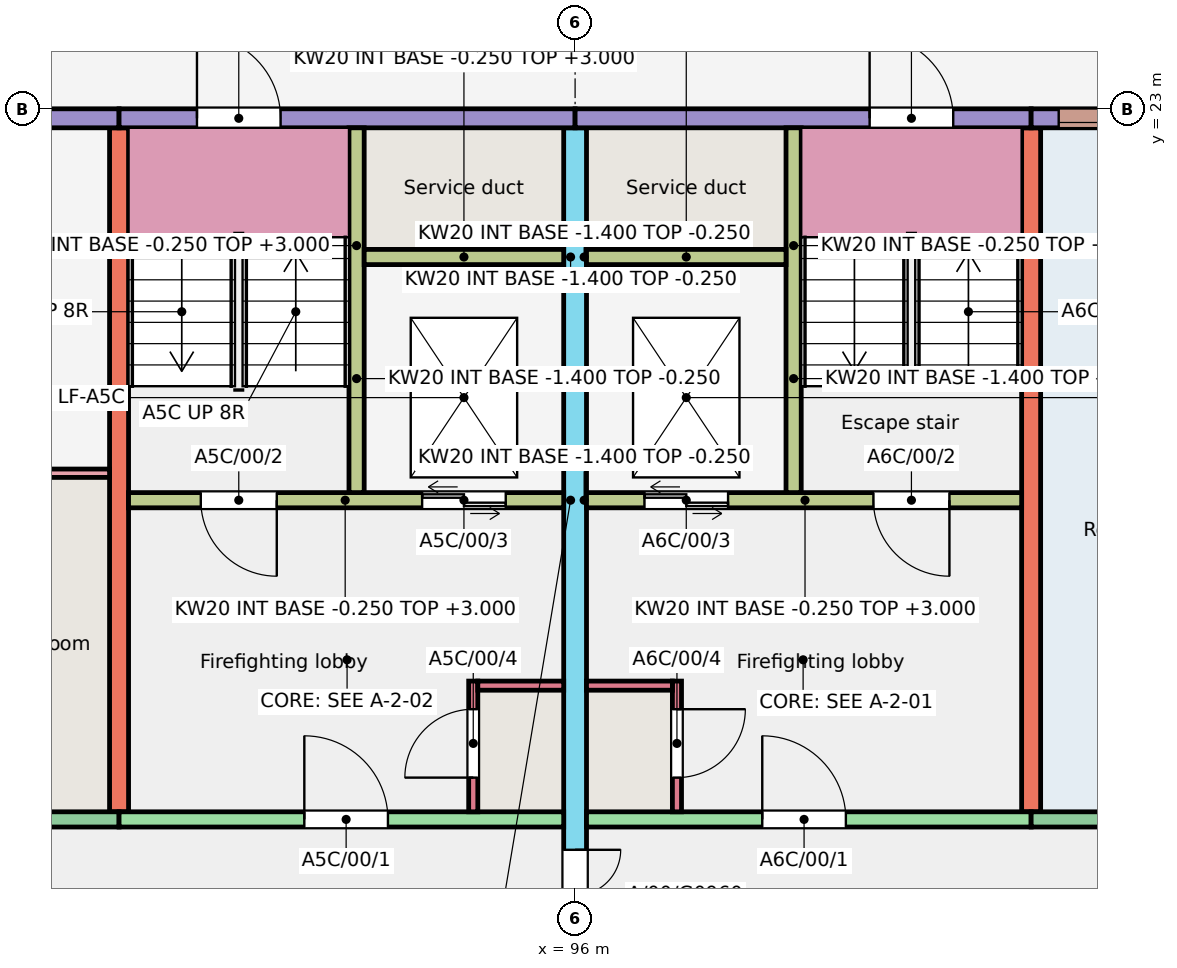
"""IFC4 building model, lengths in metres.
Left out: names, types, materials, properties, quantities, classifications, styles, units other than length and angle.
Written with IfcOpenShell. Run it as: python <this file> out.ifc"""

import sys

from ifc_helpers import new_model, si_unit, direction, frame, frame_2d, origin, place, context, subcontext, project, spatial, rectangle, extrude, element, fill, save


model = new_model("IFC4")
c1 = context("Model", 3, precision=1e-05, world=origin(), true_north=direction((0.0, 1.0)))
c2 = subcontext(c1, "Body", "Model", "MODEL_VIEW")
j1 = project(units=[si_unit("LENGTHUNIT", "METRE"), si_unit("PLANEANGLEUNIT", "RADIAN")], contexts=[c1])
p1 = place(None, origin())
s1 = spatial("IfcSite", under=j1, at=p1, CompositionType="ELEMENT")
p2 = place(p1, origin())
s2 = spatial("IfcBuilding", under=s1, at=p2, CompositionType="ELEMENT")
p3 = place(p2, origin())
s3 = spatial("IfcBuildingStorey", under=s2, at=p3, CompositionType="ELEMENT", Elevation=0.0)
p4 = place(p3, frame((90.0, 13.75, -0.25), z_axis=(0.0, 0.0, 1.0), x_axis=(0.0, 1.0, 0.0)))
e1 = element("IfcWall", 1, at=p4, inside=s3, PredefinedType="SHEAR", context=c2, shape_type="SweptSolid", body=[
    extrude(rectangle(XDim=9.0, YDim=0.25, at=frame_2d((4.5, 0.0))), origin(), (0.0, 0.0, 1.0), 3.25),
])
p5 = place(p3, frame((96.0, 11.75, -0.25), z_axis=(0.0, 0.0, 1.0), x_axis=(0.0, 1.0, 0.0)))
e2 = element("IfcWall", 2, at=p5, inside=s3, PredefinedType="SHEAR", context=c2, shape_type="SweptSolid", body=[
    extrude(rectangle(XDim=11.0, YDim=0.3, at=frame_2d((5.5, 0.0))), origin(), (0.0, 0.0, 1.0), 3.25),
])
p6 = place(p5, frame((0.3, 0.0, 0.25)))
e3 = element("IfcOpeningElement", 3, at=p6, cuts=e2, PredefinedType="OPENING", context=c2, shape_type="SweptSolid", body=[
    extrude(rectangle(XDim=1.2, YDim=2.1, at=frame_2d((0.6, 1.05))), frame((0.0, 0.16, 0.0), z_axis=(0.0, -1.0, 0.0), x_axis=(1.0, 0.0, 0.0)), (0.0, 0.0, 1.0), 0.32),
])
p7 = place(p3, frame((102.0, 13.75, -0.25), z_axis=(0.0, 0.0, 1.0), x_axis=(0.0, 1.0, 0.0)))
e4 = element("IfcWall", 4, at=p7, inside=s3, PredefinedType="SHEAR", context=c2, shape_type="SweptSolid", body=[
    extrude(rectangle(XDim=9.0, YDim=0.25, at=frame_2d((4.5, 0.0))), origin(), (0.0, 0.0, 1.0), 3.25),
])
p8 = place(p3, frame((86.4, 22.875, -0.25), z_axis=(0.0, 0.0, 1.0), x_axis=(1.0, 0.0, 0.0)))
e5 = element("IfcWall", 5, at=p8, inside=s3, PredefinedType="SOLIDWALL", context=c2, shape_type="SweptSolid", body=[
    extrude(rectangle(XDim=3.6, YDim=0.25, at=frame_2d((1.8, 0.0))), origin(), (0.0, 0.0, 1.0), 3.25),
])
p9 = place(p8, frame((1.3, 0.0, 0.25)))
e6 = element("IfcOpeningElement", 6, at=p9, cuts=e5, PredefinedType="OPENING", context=c2, shape_type="SweptSolid", body=[
    extrude(rectangle(XDim=1.0, YDim=2.1, at=frame_2d((0.5, 1.05))), frame((0.0, 0.135, 0.0), z_axis=(0.0, -1.0, 0.0), x_axis=(1.0, 0.0, 0.0)), (0.0, 0.0, 1.0), 0.27),
])
p10 = place(p3, frame((86.4, 13.65, -0.25), z_axis=(0.0, 0.0, 1.0), x_axis=(1.0, 0.0, 0.0)))
e7 = element("IfcWall", 7, at=p10, inside=s3, PredefinedType="SOLIDWALL", context=c2, shape_type="SweptSolid", body=[
    extrude(rectangle(XDim=3.6, YDim=0.2, at=frame_2d((1.8, 0.0))), origin(), (0.0, 0.0, 1.0), 3.25),
])
p11 = place(p10, frame((1.3, 0.0, 0.25)))
e8 = element("IfcOpeningElement", 8, at=p11, cuts=e7, PredefinedType="OPENING", context=c2, shape_type="SweptSolid", body=[
    extrude(rectangle(XDim=1.0, YDim=2.1, at=frame_2d((0.5, 1.05))), frame((0.0, 0.11, 0.0), z_axis=(0.0, -1.0, 0.0), x_axis=(1.0, 0.0, 0.0)), (0.0, 0.0, 1.0), 0.22),
])
p12 = place(p3, frame((90.0, 22.875, -0.25), z_axis=(0.0, 0.0, 1.0), x_axis=(1.0, 0.0, 0.0)))
e9 = element("IfcWall", 9, at=p12, inside=s3, PredefinedType="SOLIDWALL", context=c2, shape_type="SweptSolid", body=[
    extrude(rectangle(XDim=6.0, YDim=0.25, at=frame_2d((3.0, 0.0))), origin(), (0.0, 0.0, 1.0), 3.25),
])
p13 = place(p12, frame((1.025, 0.0, 0.25)))
e10 = element("IfcOpeningElement", 10, at=p13, cuts=e9, PredefinedType="OPENING", context=c2, shape_type="SweptSolid", body=[
    extrude(rectangle(XDim=1.1, YDim=2.1, at=frame_2d((0.55, 1.05))), frame((0.0, 0.135, 0.0), z_axis=(0.0, -1.0, 0.0), x_axis=(1.0, 0.0, 0.0)), (0.0, 0.0, 1.0), 0.27),
])
p14 = place(p3, frame((90.0, 13.65, -0.25), z_axis=(0.0, 0.0, 1.0), x_axis=(1.0, 0.0, 0.0)))
e11 = element("IfcWall", 11, at=p14, inside=s3, PredefinedType="SHEAR", context=c2, shape_type="SweptSolid", body=[
    extrude(rectangle(XDim=5.85, YDim=0.2, at=frame_2d((2.925, 0.0))), origin(), (0.0, 0.0, 1.0), 3.25),
])
p15 = place(p14, frame((2.438, 0.0, 0.25)))
e12 = element("IfcOpeningElement", 12, at=p15, cuts=e11, PredefinedType="OPENING", context=c2, shape_type="SweptSolid", body=[
    extrude(rectangle(XDim=1.1, YDim=2.1, at=frame_2d((0.55, 1.05))), frame((0.0, 0.11, 0.0), z_axis=(0.0, -1.0, 0.0), x_axis=(1.0, 0.0, 0.0)), (0.0, 0.0, 1.0), 0.22),
])
p16 = place(p3, frame((90.125, 17.85, -0.25), z_axis=(0.0, 0.0, 1.0), x_axis=(1.0, 0.0, 0.0)))
e13 = element("IfcWall", 13, at=p16, inside=s3, PredefinedType="SHEAR", context=c2, shape_type="SweptSolid", body=[
    extrude(rectangle(XDim=5.725, YDim=0.2, at=frame_2d((2.863, 0.0))), origin(), (0.0, 0.0, 1.0), 3.25),
])
p17 = place(p16, frame((0.95, 0.0, 0.25)))
e14 = element("IfcOpeningElement", 14, at=p17, cuts=e13, PredefinedType="OPENING", context=c2, shape_type="SweptSolid", body=[
    extrude(rectangle(XDim=1.0, YDim=2.1, at=frame_2d((0.5, 1.05))), frame((0.0, 0.11, 0.0), z_axis=(0.0, -1.0, 0.0), x_axis=(1.0, 0.0, 0.0)), (0.0, 0.0, 1.0), 0.22),
])
p18 = place(p16, frame((3.863, 0.0, 0.25)))
e15 = element("IfcOpeningElement", 15, at=p18, cuts=e13, PredefinedType="OPENING", context=c2, shape_type="SweptSolid", body=[
    extrude(rectangle(XDim=1.1, YDim=2.1, at=frame_2d((0.55, 1.05))), frame((0.0, 0.11, 0.0), z_axis=(0.0, -1.0, 0.0), x_axis=(1.0, 0.0, 0.0)), (0.0, 0.0, 1.0), 0.22),
])
p19 = place(p3, frame((93.125, 17.95, -0.25), z_axis=(0.0, 0.0, 1.0), x_axis=(0.0, 1.0, 0.0)))
e16 = element("IfcWall", 16, at=p19, inside=s3, PredefinedType="SHEAR", context=c2, shape_type="SweptSolid", body=[
    extrude(rectangle(XDim=4.8, YDim=0.2, at=frame_2d((2.4, 0.0))), origin(), (0.0, 0.0, 1.0), 3.25),
])
p20 = place(p3, frame((93.225, 21.05, -0.25), z_axis=(0.0, 0.0, 1.0), x_axis=(1.0, 0.0, 0.0)))
e17 = element("IfcWall", 17, at=p20, inside=s3, PredefinedType="SHEAR", context=c2, shape_type="SweptSolid", body=[
    extrude(rectangle(XDim=2.625, YDim=0.2, at=frame_2d((1.312, 0.0))), origin(), (0.0, 0.0, 1.0), 3.25),
])
p21 = place(p3, frame((94.66, 13.75, -0.25), z_axis=(0.0, 0.0, 1.0), x_axis=(0.0, 1.0, 0.0)))
e18 = element("IfcWall", 18, at=p21, inside=s3, PredefinedType="SHEAR", context=c2, shape_type="SweptSolid", body=[
    extrude(rectangle(XDim=1.72, YDim=0.12, at=frame_2d((0.86, 0.0))), origin(), (0.0, 0.0, 1.0), 3.25),
])
p22 = place(p21, frame((0.45, 0.0, 0.25)))
e19 = element("IfcOpeningElement", 19, at=p22, cuts=e18, PredefinedType="OPENING", context=c2, shape_type="SweptSolid", body=[
    extrude(rectangle(XDim=0.9, YDim=2.1, at=frame_2d((0.45, 1.05))), frame((0.0, 0.07, 0.0), z_axis=(0.0, -1.0, 0.0), x_axis=(1.0, 0.0, 0.0)), (0.0, 0.0, 1.0), 0.14),
])
p23 = place(p3, frame((94.72, 15.41, -0.25), z_axis=(0.0, 0.0, 1.0), x_axis=(1.0, 0.0, 0.0)))
e20 = element("IfcWall", 20, at=p23, inside=s3, PredefinedType="SHEAR", context=c2, shape_type="SweptSolid", body=[
    extrude(rectangle(XDim=1.13, YDim=0.12, at=frame_2d((0.565, 0.0))), origin(), (0.0, 0.0, 1.0), 3.25),
])
p24 = place(p3, frame((96.0, 22.875, -0.25), z_axis=(0.0, 0.0, 1.0), x_axis=(1.0, 0.0, 0.0)))
e21 = element("IfcWall", 21, at=p24, inside=s3, PredefinedType="SOLIDWALL", context=c2, shape_type="SweptSolid", body=[
    extrude(rectangle(XDim=6.0, YDim=0.25, at=frame_2d((3.0, 0.0))), origin(), (0.0, 0.0, 1.0), 3.25),
])
p25 = place(p24, frame((3.875, 0.0, 0.25)))
e22 = element("IfcOpeningElement", 22, at=p25, cuts=e21, PredefinedType="OPENING", context=c2, shape_type="SweptSolid", body=[
    extrude(rectangle(XDim=1.1, YDim=2.1, at=frame_2d((0.55, 1.05))), frame((0.0, 0.135, 0.0), z_axis=(0.0, -1.0, 0.0), x_axis=(1.0, 0.0, 0.0)), (0.0, 0.0, 1.0), 0.27),
])
p26 = place(p3, frame((96.15, 13.65, -0.25), z_axis=(0.0, 0.0, 1.0), x_axis=(1.0, 0.0, 0.0)))
e23 = element("IfcWall", 23, at=p26, inside=s3, PredefinedType="SHEAR", context=c2, shape_type="SweptSolid", body=[
    extrude(rectangle(XDim=5.85, YDim=0.2, at=frame_2d((2.925, 0.0))), origin(), (0.0, 0.0, 1.0), 3.25),
])
p27 = place(p26, frame((2.312, 0.0, 0.25)))
e24 = element("IfcOpeningElement", 24, at=p27, cuts=e23, PredefinedType="OPENING", context=c2, shape_type="SweptSolid", body=[
    extrude(rectangle(XDim=1.1, YDim=2.1, at=frame_2d((0.55, 1.05))), frame((0.0, 0.11, 0.0), z_axis=(0.0, -1.0, 0.0), x_axis=(1.0, 0.0, 0.0)), (0.0, 0.0, 1.0), 0.22),
])
p28 = place(p3, frame((96.15, 17.85, -0.25), z_axis=(0.0, 0.0, 1.0), x_axis=(1.0, 0.0, 0.0)))
e25 = element("IfcWall", 25, at=p28, inside=s3, PredefinedType="SHEAR", context=c2, shape_type="SweptSolid", body=[
    extrude(rectangle(XDim=5.725, YDim=0.2, at=frame_2d((2.863, 0.0))), origin(), (0.0, 0.0, 1.0), 3.25),
])
p29 = place(p28, frame((3.775, 0.0, 0.25)))
e26 = element("IfcOpeningElement", 26, at=p29, cuts=e25, PredefinedType="OPENING", context=c2, shape_type="SweptSolid", body=[
    extrude(rectangle(XDim=1.0, YDim=2.1, at=frame_2d((0.5, 1.05))), frame((0.0, 0.11, 0.0), z_axis=(0.0, -1.0, 0.0), x_axis=(1.0, 0.0, 0.0)), (0.0, 0.0, 1.0), 0.22),
])
p30 = place(p28, frame((0.762, 0.0, 0.25)))
e27 = element("IfcOpeningElement", 27, at=p30, cuts=e25, PredefinedType="OPENING", context=c2, shape_type="SweptSolid", body=[
    extrude(rectangle(XDim=1.1, YDim=2.1, at=frame_2d((0.55, 1.05))), frame((0.0, 0.11, 0.0), z_axis=(0.0, -1.0, 0.0), x_axis=(1.0, 0.0, 0.0)), (0.0, 0.0, 1.0), 0.22),
])
p31 = place(p3, frame((98.875, 17.95, -0.25), z_axis=(0.0, 0.0, 1.0), x_axis=(0.0, 1.0, 0.0)))
e28 = element("IfcWall", 28, at=p31, inside=s3, PredefinedType="SHEAR", context=c2, shape_type="SweptSolid", body=[
    extrude(rectangle(XDim=4.8, YDim=0.2, at=frame_2d((2.4, 0.0))), origin(), (0.0, 0.0, 1.0), 3.25),
])
p32 = place(p3, frame((96.15, 21.05, -0.25), z_axis=(0.0, 0.0, 1.0), x_axis=(1.0, 0.0, 0.0)))
e29 = element("IfcWall", 29, at=p32, inside=s3, PredefinedType="SHEAR", context=c2, shape_type="SweptSolid", body=[
    extrude(rectangle(XDim=2.625, YDim=0.2, at=frame_2d((1.312, 0.0))), origin(), (0.0, 0.0, 1.0), 3.25),
])
p33 = place(p3, frame((97.34, 13.75, -0.25), z_axis=(0.0, 0.0, 1.0), x_axis=(0.0, 1.0, 0.0)))
e30 = element("IfcWall", 30, at=p33, inside=s3, PredefinedType="SHEAR", context=c2, shape_type="SweptSolid", body=[
    extrude(rectangle(XDim=1.72, YDim=0.12, at=frame_2d((0.86, 0.0))), origin(), (0.0, 0.0, 1.0), 3.25),
])
p34 = place(p33, frame((0.45, 0.0, 0.25)))
e31 = element("IfcOpeningElement", 31, at=p34, cuts=e30, PredefinedType="OPENING", context=c2, shape_type="SweptSolid", body=[
    extrude(rectangle(XDim=0.9, YDim=2.1, at=frame_2d((0.45, 1.05))), frame((0.0, 0.07, 0.0), z_axis=(0.0, -1.0, 0.0), x_axis=(1.0, 0.0, 0.0)), (0.0, 0.0, 1.0), 0.14),
])
p35 = place(p3, frame((96.15, 15.41, -0.25), z_axis=(0.0, 0.0, 1.0), x_axis=(1.0, 0.0, 0.0)))
e32 = element("IfcWall", 32, at=p35, inside=s3, PredefinedType="SHEAR", context=c2, shape_type="SweptSolid", body=[
    extrude(rectangle(XDim=1.13, YDim=0.12, at=frame_2d((0.565, 0.0))), origin(), (0.0, 0.0, 1.0), 3.25),
])
p36 = place(p3, frame((102.0, 22.875, -0.25), z_axis=(0.0, 0.0, 1.0), x_axis=(1.0, 0.0, 0.0)))
e33 = element("IfcWall", 33, at=p36, inside=s3, PredefinedType="SOLIDWALL", context=c2, shape_type="SweptSolid", body=[
    extrude(rectangle(XDim=3.6, YDim=0.25, at=frame_2d((1.8, 0.0))), origin(), (0.0, 0.0, 1.0), 3.25),
])
p37 = place(p36, frame((0.363, 0.0, 2.05)))
e34 = element("IfcOpeningElement", 34, at=p37, cuts=e33, PredefinedType="OPENING", context=c2, shape_type="SweptSolid", body=[
    extrude(rectangle(XDim=0.6, YDim=0.6, at=frame_2d((0.3, 0.3))), frame((0.0, 0.135, 0.0), z_axis=(0.0, -1.0, 0.0), x_axis=(1.0, 0.0, 0.0)), (0.0, 0.0, 1.0), 0.27),
])
p38 = place(p36, frame((1.3, 0.0, 0.25)))
e35 = element("IfcOpeningElement", 35, at=p38, cuts=e33, PredefinedType="OPENING", context=c2, shape_type="SweptSolid", body=[
    extrude(rectangle(XDim=1.0, YDim=2.1, at=frame_2d((0.5, 1.05))), frame((0.0, 0.135, 0.0), z_axis=(0.0, -1.0, 0.0), x_axis=(1.0, 0.0, 0.0)), (0.0, 0.0, 1.0), 0.27),
])
p39 = place(p3, frame((102.0, 13.65, -0.25), z_axis=(0.0, 0.0, 1.0), x_axis=(1.0, 0.0, 0.0)))
e36 = element("IfcWall", 36, at=p39, inside=s3, PredefinedType="SOLIDWALL", context=c2, shape_type="SweptSolid", body=[
    extrude(rectangle(XDim=3.6, YDim=0.2, at=frame_2d((1.8, 0.0))), origin(), (0.0, 0.0, 1.0), 3.25),
])
p40 = place(p39, frame((1.3, 0.0, 0.25)))
e37 = element("IfcOpeningElement", 37, at=p40, cuts=e36, PredefinedType="OPENING", context=c2, shape_type="SweptSolid", body=[
    extrude(rectangle(XDim=1.0, YDim=2.1, at=frame_2d((0.5, 1.05))), frame((0.0, 0.11, 0.0), z_axis=(0.0, -1.0, 0.0), x_axis=(1.0, 0.0, 0.0)), (0.0, 0.0, 1.0), 0.22),
])
for number, where, z_axis, x_axis in (
    (38, (93.025, 17.85, -1.4), (0.0, 0.0, 1.0), (1.0, 0.0, 0.0)),
    (39, (93.025, 21.05, -1.4), (0.0, 0.0, 1.0), (1.0, 0.0, 0.0)),
):
    element("IfcWall", number, at=place(p3, frame(where, z_axis=z_axis, x_axis=x_axis)), inside=s3, PredefinedType="SHEAR", context=c2, shape_type="SweptSolid", body=[
        extrude(rectangle(XDim=2.975, YDim=0.2, at=frame_2d((1.488, 0.0))), origin(), (0.0, 0.0, 1.0), 1.15),
    ])
p41 = place(p3, frame((93.125, 17.95, -1.4), z_axis=(0.0, 0.0, 1.0), x_axis=(0.0, 1.0, 0.0)))
e40 = element("IfcWall", 40, at=p41, inside=s3, PredefinedType="SHEAR", context=c2, shape_type="SweptSolid", body=[
    extrude(rectangle(XDim=3.0, YDim=0.2, at=frame_2d((1.5, 0.0))), origin(), (0.0, 0.0, 1.0), 1.15),
])
p42 = place(p3, frame((95.925, 17.95, -1.4), z_axis=(0.0, 0.0, 1.0), x_axis=(0.0, 1.0, 0.0)))
e41 = element("IfcWall", 41, at=p42, inside=s3, PredefinedType="SHEAR", context=c2, shape_type="SweptSolid", body=[
    extrude(rectangle(XDim=3.0, YDim=0.15, at=frame_2d((1.5, 0.0))), origin(), (0.0, 0.0, 1.0), 1.15),
])
for number, where, z_axis, x_axis in (
    (42, (96.0, 17.85, -1.4), (0.0, 0.0, 1.0), (1.0, 0.0, 0.0)),
    (43, (96.0, 21.05, -1.4), (0.0, 0.0, 1.0), (1.0, 0.0, 0.0)),
):
    element("IfcWall", number, at=place(p3, frame(where, z_axis=z_axis, x_axis=x_axis)), inside=s3, PredefinedType="SHEAR", context=c2, shape_type="SweptSolid", body=[
        extrude(rectangle(XDim=2.975, YDim=0.2, at=frame_2d((1.488, 0.0))), origin(), (0.0, 0.0, 1.0), 1.15),
    ])
p43 = place(p3, frame((98.875, 17.95, -1.4), z_axis=(0.0, 0.0, 1.0), x_axis=(0.0, 1.0, 0.0)))
e44 = element("IfcWall", 44, at=p43, inside=s3, PredefinedType="SHEAR", context=c2, shape_type="SweptSolid", body=[
    extrude(rectangle(XDim=3.0, YDim=0.2, at=frame_2d((1.5, 0.0))), origin(), (0.0, 0.0, 1.0), 1.15),
])
p44 = place(p3, frame((96.075, 17.95, -1.4), z_axis=(0.0, 0.0, 1.0), x_axis=(0.0, 1.0, 0.0)))
e45 = element("IfcWall", 45, at=p44, inside=s3, PredefinedType="SHEAR", context=c2, shape_type="SweptSolid", body=[
    extrude(rectangle(XDim=3.0, YDim=0.15, at=frame_2d((1.5, 0.0))), origin(), (0.0, 0.0, 1.0), 1.15),
])
p45 = place(p3, frame((86.525, 18.205, 0.0), z_axis=(0.0, 0.0, 1.0), x_axis=(1.0, 0.0, 0.0)))
e46 = element("IfcWall", 46, at=p45, inside=s3, PredefinedType="PARTITIONING", context=c2, shape_type="SweptSolid", body=[
    extrude(rectangle(XDim=3.35, YDim=0.11, at=frame_2d((1.675, 0.0))), origin(), (0.0, 0.0, 1.0), 2.8),
])
p46 = place(p37, origin())
e47 = element("IfcWindow", 47, at=p46, inside=s3, PartitioningType="SINGLE_PANEL", PredefinedType="WINDOW", context=c2, shape_type="SweptSolid", body=[
    extrude(rectangle(XDim=0.6, YDim=0.6, at=frame_2d((0.3, 0.3))), frame((0.0, -0.025, 0.0), z_axis=(0.0, -1.0, 0.0), x_axis=(1.0, 0.0, 0.0)), (0.0, 0.0, 1.0), 0.06),
])
fill(e34, e47)
p47 = place(p15, origin())
e48 = element("IfcDoor", 48, at=p47, inside=s3, OperationType="SINGLE_SWING_LEFT", PredefinedType="DOOR", context=c2, shape_type="SweptSolid", body=[
    extrude(rectangle(XDim=1.1, YDim=2.1, at=frame_2d((0.55, 1.05))), frame((0.0, 0.025, 0.0), z_axis=(0.0, -1.0, 0.0), x_axis=(1.0, 0.0, 0.0)), (0.0, 0.0, 1.0), 0.05),
])
fill(e12, e48)
p48 = place(p17, origin())
e49 = element("IfcDoor", 49, at=p48, inside=s3, OperationType="SINGLE_SWING_RIGHT", PredefinedType="DOOR", context=c2, shape_type="SweptSolid", body=[
    extrude(rectangle(XDim=1.0, YDim=2.1, at=frame_2d((0.5, 1.05))), frame((0.0, 0.025, 0.0), z_axis=(0.0, -1.0, 0.0), x_axis=(1.0, 0.0, 0.0)), (0.0, 0.0, 1.0), 0.05),
])
fill(e14, e49)
p49 = place(p18, origin())
e50 = element("IfcDoor", 50, at=p49, inside=s3, OperationType="DOUBLE_DOOR_SLIDING", PredefinedType="DOOR", context=c2, shape_type="SweptSolid", body=[
    extrude(rectangle(XDim=1.1, YDim=2.1, at=frame_2d((0.55, 1.05))), frame((0.0, 0.025, 0.0), z_axis=(0.0, -1.0, 0.0), x_axis=(1.0, 0.0, 0.0)), (0.0, 0.0, 1.0), 0.05),
])
fill(e15, e50)
p50 = place(p22, origin())
e51 = element("IfcDoor", 51, at=p50, inside=s3, OperationType="SINGLE_SWING_LEFT", PredefinedType="DOOR", context=c2, shape_type="SweptSolid", body=[
    extrude(rectangle(XDim=0.9, YDim=2.1, at=frame_2d((0.45, 1.05))), frame((0.0, 0.025, 0.0), z_axis=(0.0, -1.0, 0.0), x_axis=(1.0, 0.0, 0.0)), (0.0, 0.0, 1.0), 0.05),
])
fill(e19, e51)
p51 = place(p13, origin())
e52 = element("IfcDoor", 52, at=p51, inside=s3, OperationType="SINGLE_SWING_LEFT", PredefinedType="DOOR", context=c2, shape_type="SweptSolid", body=[
    extrude(rectangle(XDim=1.1, YDim=2.1, at=frame_2d((0.55, 1.05))), frame((0.0, 0.025, 0.0), z_axis=(0.0, -1.0, 0.0), x_axis=(1.0, 0.0, 0.0)), (0.0, 0.0, 1.0), 0.05),
])
fill(e10, e52)
p52 = place(p27, origin())
e53 = element("IfcDoor", 53, at=p52, inside=s3, OperationType="SINGLE_SWING_LEFT", PredefinedType="DOOR", context=c2, shape_type="SweptSolid", body=[
    extrude(rectangle(XDim=1.1, YDim=2.1, at=frame_2d((0.55, 1.05))), frame((0.0, 0.025, 0.0), z_axis=(0.0, -1.0, 0.0), x_axis=(1.0, 0.0, 0.0)), (0.0, 0.0, 1.0), 0.05),
])
fill(e24, e53)
p53 = place(p29, origin())
e54 = element("IfcDoor", 54, at=p53, inside=s3, OperationType="SINGLE_SWING_RIGHT", PredefinedType="DOOR", context=c2, shape_type="SweptSolid", body=[
    extrude(rectangle(XDim=1.0, YDim=2.1, at=frame_2d((0.5, 1.05))), frame((0.0, 0.025, 0.0), z_axis=(0.0, -1.0, 0.0), x_axis=(1.0, 0.0, 0.0)), (0.0, 0.0, 1.0), 0.05),
])
fill(e26, e54)
p54 = place(p30, origin())
e55 = element("IfcDoor", 55, at=p54, inside=s3, OperationType="DOUBLE_DOOR_SLIDING", PredefinedType="DOOR", context=c2, shape_type="SweptSolid", body=[
    extrude(rectangle(XDim=1.1, YDim=2.1, at=frame_2d((0.55, 1.05))), frame((0.0, 0.025, 0.0), z_axis=(0.0, -1.0, 0.0), x_axis=(1.0, 0.0, 0.0)), (0.0, 0.0, 1.0), 0.05),
])
fill(e27, e55)
p55 = place(p34, origin())
e56 = element("IfcDoor", 56, at=p55, inside=s3, OperationType="SINGLE_SWING_RIGHT", PredefinedType="DOOR", context=c2, shape_type="SweptSolid", body=[
    extrude(rectangle(XDim=0.9, YDim=2.1, at=frame_2d((0.45, 1.05))), frame((0.0, 0.025, 0.0), z_axis=(0.0, -1.0, 0.0), x_axis=(1.0, 0.0, 0.0)), (0.0, 0.0, 1.0), 0.05),
])
fill(e31, e56)
p56 = place(p25, origin())
e57 = element("IfcDoor", 57, at=p56, inside=s3, OperationType="SINGLE_SWING_LEFT", PredefinedType="DOOR", context=c2, shape_type="SweptSolid", body=[
    extrude(rectangle(XDim=1.1, YDim=2.1, at=frame_2d((0.55, 1.05))), frame((0.0, 0.025, 0.0), z_axis=(0.0, -1.0, 0.0), x_axis=(1.0, 0.0, 0.0)), (0.0, 0.0, 1.0), 0.05),
])
fill(e22, e57)
p57 = place(p6, origin())
e58 = element("IfcDoor", 58, at=p57, inside=s3, OperationType="DOUBLE_DOOR_SINGLE_SWING", PredefinedType="DOOR", context=c2, shape_type="SweptSolid", body=[
    extrude(rectangle(XDim=1.2, YDim=2.1, at=frame_2d((0.6, 1.05))), frame((0.0, 0.025, 0.0), z_axis=(0.0, -1.0, 0.0), x_axis=(1.0, 0.0, 0.0)), (0.0, 0.0, 1.0), 0.05),
])
fill(e3, e58)
save(model, sys.argv[1])
